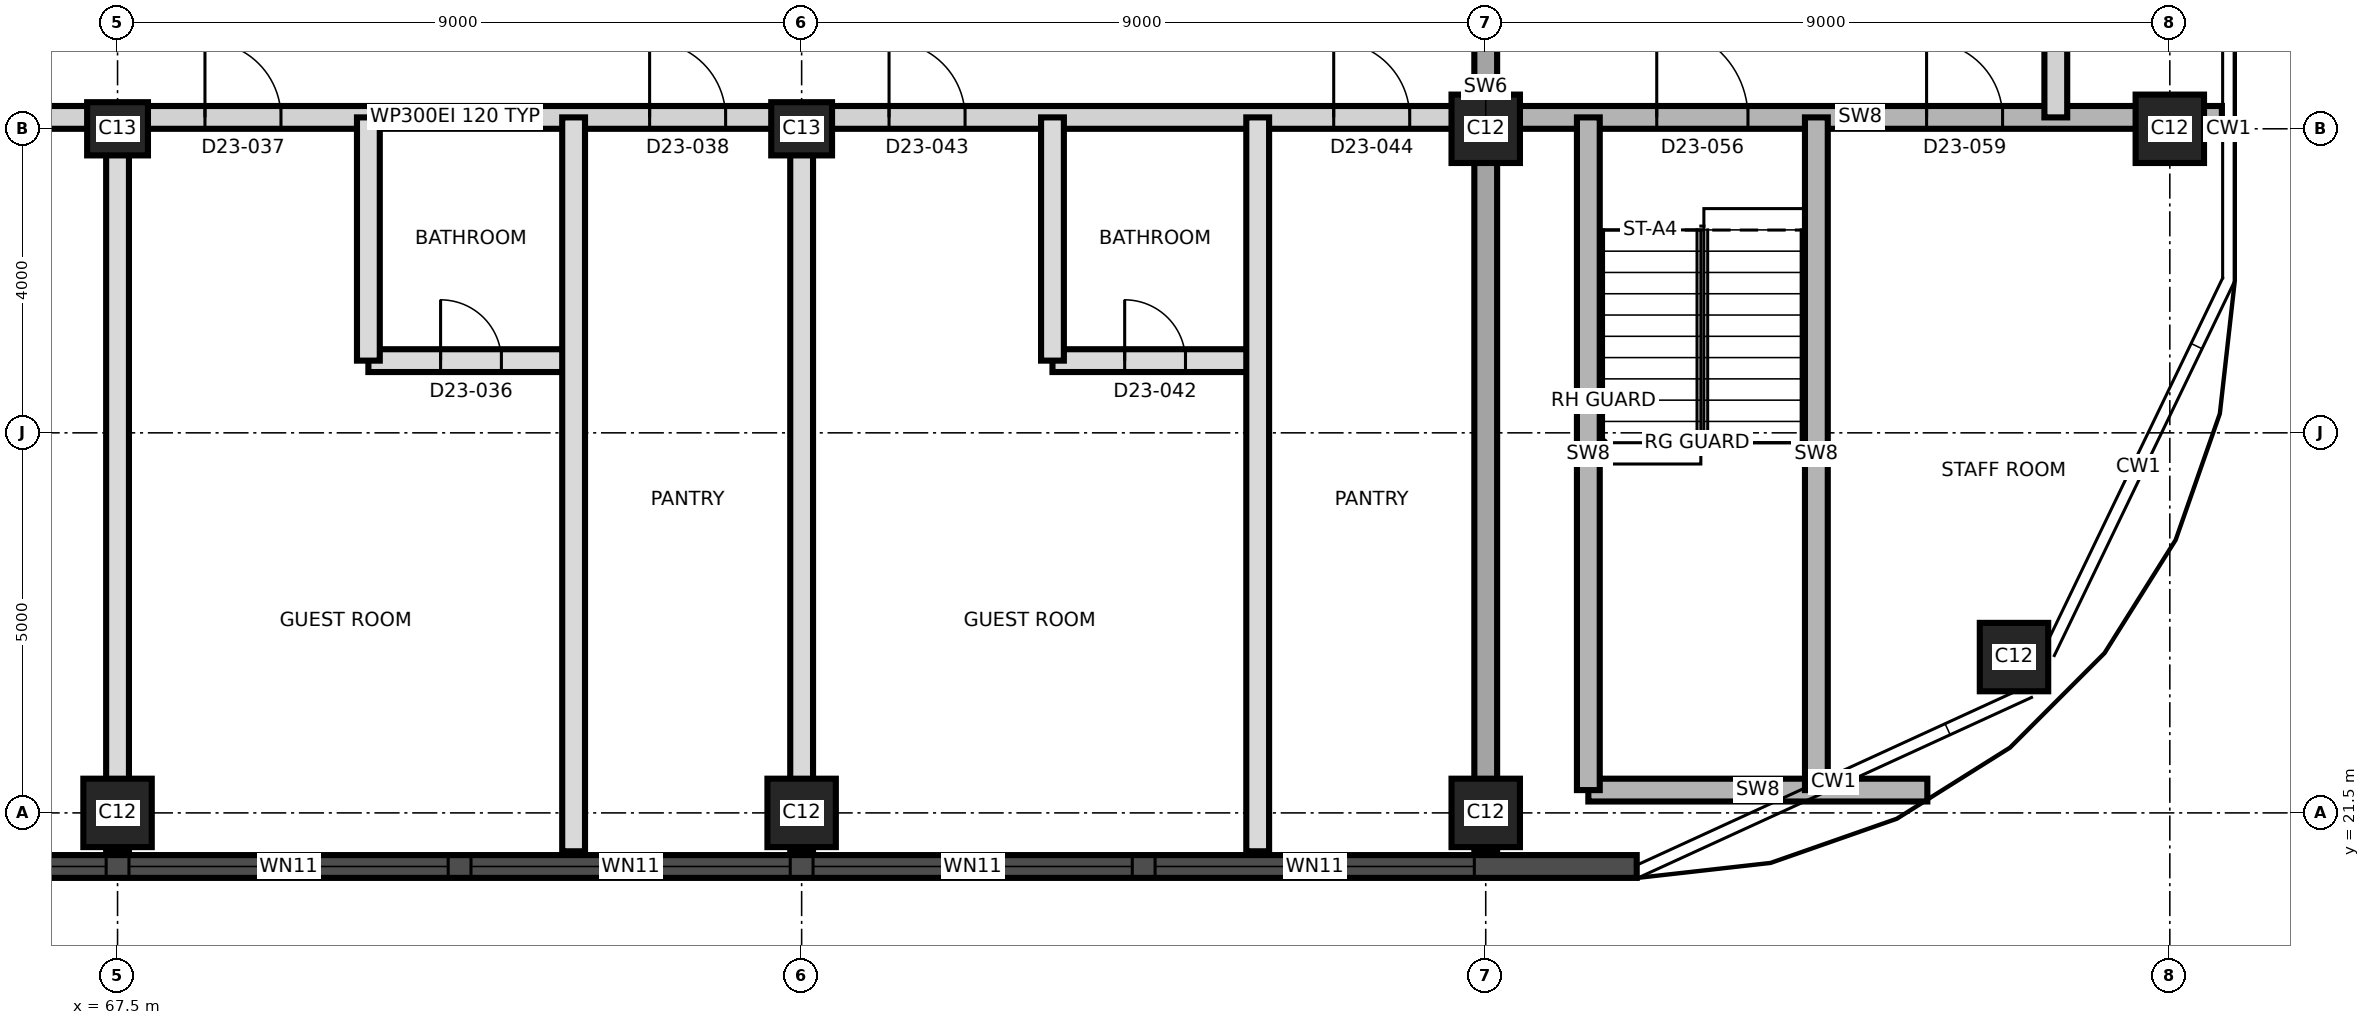
"""IFC4 building model, lengths in metres.
Left out: names, types, materials, properties, quantities, classifications, styles, units other than length and angle.
Written with IfcOpenShell. Run it as: python <this file> out.ifc"""

import sys

from ifc_helpers import new_model, si_unit, direction, frame, frame_2d, origin, origin_2d, place, context, subcontext, project, spatial, rectangle, extrude, element, fill, save


model = new_model("IFC4")
c1 = context("Model", 3, precision=1e-05, world=origin(), true_north=direction((0.0, 1.0)))
c2 = subcontext(c1, "Body", "Model", "MODEL_VIEW")
j1 = project(units=[si_unit("LENGTHUNIT", "METRE"), si_unit("PLANEANGLEUNIT", "RADIAN")], contexts=[c1])
p1 = place(None, origin())
s1 = spatial("IfcSite", under=j1, at=p1, CompositionType="ELEMENT")
p2 = place(p1, origin())
s2 = spatial("IfcBuilding", under=s1, at=p2, CompositionType="ELEMENT")
p3 = place(p2, frame((0.0, 0.0, 210.6)))
s3 = spatial("IfcBuildingStorey", under=s2, at=p3, CompositionType="ELEMENT", Elevation=210.6)
for number, where, z_axis, x_axis in (
    (1, (67.5, 21.5, 0.0), (0.0, 0.0, 1.0), (1.0, 0.0, 0.0)),
    (2, (76.5, 21.5, 0.0), (0.0, 0.0, 1.0), (1.0, 0.0, 0.0)),
    (3, (85.5, 21.5, 0.0), (0.0, 0.0, 1.0), (1.0, 0.0, 0.0)),
    (4, (92.45, 23.55, 0.0), (0.0, 0.0, 1.0), (1.0, 0.0, 0.0)),
):
    element("IfcColumn", number, at=place(p3, frame(where, z_axis=z_axis, x_axis=x_axis)), inside=s3, PredefinedType="COLUMN", context=c2, shape_type="SweptSolid", body=[
        extrude(rectangle(XDim=0.9, YDim=0.9, at=origin_2d()), origin(), (0.0, 0.0, 1.0), 3.7),
    ])
for number, where, z_axis, x_axis in (
    (5, (67.5, 30.5, 0.0), (0.0, 0.0, 1.0), (1.0, 0.0, 0.0)),
    (6, (76.5, 30.5, 0.0), (0.0, 0.0, 1.0), (1.0, 0.0, 0.0)),
):
    element("IfcColumn", number, at=place(p3, frame(where, z_axis=z_axis, x_axis=x_axis)), inside=s3, PredefinedType="COLUMN", context=c2, shape_type="SweptSolid", body=[
        extrude(rectangle(XDim=0.8, YDim=0.7, at=origin_2d()), origin(), (0.0, 0.0, 1.0), 3.7),
    ])
for number, where, z_axis, x_axis in (
    (7, (85.5, 30.5, 0.0), (0.0, 0.0, 1.0), (1.0, 0.0, 0.0)),
    (8, (94.5, 30.5, 0.0), (0.0, 0.0, 1.0), (1.0, 0.0, 0.0)),
):
    element("IfcColumn", number, at=place(p3, frame(where, z_axis=z_axis, x_axis=x_axis)), inside=s3, PredefinedType="COLUMN", context=c2, shape_type="SweptSolid", body=[
        extrude(rectangle(XDim=0.9, YDim=0.9, at=origin_2d()), origin(), (0.0, 0.0, 1.0), 3.7),
    ])
p4 = place(p3, frame((85.5, 20.995, 0.0), z_axis=(0.0, 0.0, 1.0), x_axis=(0.0, 1.0, 0.0)))
e9 = element("IfcWall", 9, at=p4, inside=s3, PredefinedType="SHEAR", context=c2, shape_type="SweptSolid", body=[
    extrude(rectangle(XDim=19.01, YDim=0.3, at=frame_2d((9.505, 0.0))), origin(), (0.0, 0.0, 1.0), 3.7),
])
p5 = place(p4, frame((10.705, 0.0, 0.0)))
e10 = element("IfcOpeningElement", 10, at=p5, cuts=e9, PredefinedType="OPENING", context=c2, shape_type="SweptSolid", body=[
    extrude(rectangle(XDim=1.4, YDim=2.1, at=frame_2d((0.7, 1.05))), frame((0.0, 0.16, 0.0), z_axis=(0.0, -1.0, 0.0), x_axis=(1.0, 0.0, 0.0)), (0.0, 0.0, 1.0), 0.32),
])
p6 = place(p3, frame((44.011, 20.795, 0.0), z_axis=(0.0, 0.0, 1.0), x_axis=(1.0, 0.0, 0.0)))
e11 = element("IfcWall", 11, at=p6, inside=s3, PredefinedType="SOLIDWALL", context=c2, shape_type="SweptSolid", body=[
    extrude(rectangle(XDim=43.476, YDim=0.3, at=frame_2d((21.738, 0.0))), origin(), (0.0, 0.0, 1.0), 3.4),
])
p7 = place(p6, frame((1.845, 0.0, 0.3)))
e12 = element("IfcOpeningElement", 12, at=p7, cuts=e11, PredefinedType="OPENING", context=c2, shape_type="SweptSolid", body=[
    extrude(rectangle(XDim=1.8, YDim=2.4, at=frame_2d((0.9, 1.2))), frame((0.0, 0.16, 0.0), z_axis=(0.0, -1.0, 0.0), x_axis=(1.0, 0.0, 0.0)), (0.0, 0.0, 1.0), 0.32),
])
p8 = place(p6, frame((5.639, 0.0, 0.9)))
e13 = element("IfcOpeningElement", 13, at=p8, cuts=e11, PredefinedType="OPENING", context=c2, shape_type="SweptSolid", body=[
    extrude(rectangle(XDim=4.2, YDim=1.5, at=frame_2d((2.1, 0.75))), frame((0.0, 0.16, 0.0), z_axis=(0.0, -1.0, 0.0), x_axis=(1.0, 0.0, 0.0)), (0.0, 0.0, 1.0), 0.32),
])
p9 = place(p6, frame((10.139, 0.0, 0.9)))
e14 = element("IfcOpeningElement", 14, at=p9, cuts=e11, PredefinedType="OPENING", context=c2, shape_type="SweptSolid", body=[
    extrude(rectangle(XDim=4.2, YDim=1.5, at=frame_2d((2.1, 0.75))), frame((0.0, 0.16, 0.0), z_axis=(0.0, -1.0, 0.0), x_axis=(1.0, 0.0, 0.0)), (0.0, 0.0, 1.0), 0.32),
])
p10 = place(p6, frame((14.639, 0.0, 0.9)))
e15 = element("IfcOpeningElement", 15, at=p10, cuts=e11, PredefinedType="OPENING", context=c2, shape_type="SweptSolid", body=[
    extrude(rectangle(XDim=4.2, YDim=1.5, at=frame_2d((2.1, 0.75))), frame((0.0, 0.16, 0.0), z_axis=(0.0, -1.0, 0.0), x_axis=(1.0, 0.0, 0.0)), (0.0, 0.0, 1.0), 0.32),
])
p11 = place(p6, frame((19.139, 0.0, 0.9)))
e16 = element("IfcOpeningElement", 16, at=p11, cuts=e11, PredefinedType="OPENING", context=c2, shape_type="SweptSolid", body=[
    extrude(rectangle(XDim=4.2, YDim=1.5, at=frame_2d((2.1, 0.75))), frame((0.0, 0.16, 0.0), z_axis=(0.0, -1.0, 0.0), x_axis=(1.0, 0.0, 0.0)), (0.0, 0.0, 1.0), 0.32),
])
p12 = place(p6, frame((23.639, 0.0, 0.9)))
e17 = element("IfcOpeningElement", 17, at=p12, cuts=e11, PredefinedType="OPENING", context=c2, shape_type="SweptSolid", body=[
    extrude(rectangle(XDim=4.2, YDim=1.5, at=frame_2d((2.1, 0.75))), frame((0.0, 0.16, 0.0), z_axis=(0.0, -1.0, 0.0), x_axis=(1.0, 0.0, 0.0)), (0.0, 0.0, 1.0), 0.32),
])
p13 = place(p6, frame((28.139, 0.0, 0.9)))
e18 = element("IfcOpeningElement", 18, at=p13, cuts=e11, PredefinedType="OPENING", context=c2, shape_type="SweptSolid", body=[
    extrude(rectangle(XDim=4.2, YDim=1.5, at=frame_2d((2.1, 0.75))), frame((0.0, 0.16, 0.0), z_axis=(0.0, -1.0, 0.0), x_axis=(1.0, 0.0, 0.0)), (0.0, 0.0, 1.0), 0.32),
])
p14 = place(p6, frame((32.639, 0.0, 0.9)))
e19 = element("IfcOpeningElement", 19, at=p14, cuts=e11, PredefinedType="OPENING", context=c2, shape_type="SweptSolid", body=[
    extrude(rectangle(XDim=4.2, YDim=1.5, at=frame_2d((2.1, 0.75))), frame((0.0, 0.16, 0.0), z_axis=(0.0, -1.0, 0.0), x_axis=(1.0, 0.0, 0.0)), (0.0, 0.0, 1.0), 0.32),
])
p15 = place(p6, frame((37.139, 0.0, 0.9)))
e20 = element("IfcOpeningElement", 20, at=p15, cuts=e11, PredefinedType="OPENING", context=c2, shape_type="SweptSolid", body=[
    extrude(rectangle(XDim=4.2, YDim=1.5, at=frame_2d((2.1, 0.75))), frame((0.0, 0.16, 0.0), z_axis=(0.0, -1.0, 0.0), x_axis=(1.0, 0.0, 0.0)), (0.0, 0.0, 1.0), 0.32),
])
p16 = place(p3, frame((86.85, 21.8, 0.0), z_axis=(0.0, 0.0, 1.0), x_axis=(1.0, 0.0, 0.0)))
e21 = element("IfcWall", 21, at=p16, inside=s3, PredefinedType="SHEAR", context=c2, shape_type="SweptSolid", body=[
    extrude(rectangle(XDim=4.46, YDim=0.3, at=frame_2d((2.23, 0.0))), origin(), (0.0, 0.0, 1.0), 3.4),
])
p17 = place(p3, frame((70.8, 27.45, 0.0), z_axis=(0.0, 0.0, 1.0), x_axis=(1.0, 0.0, 0.0)))
e22 = element("IfcWall", 22, at=p17, inside=s3, PredefinedType="PARTITIONING", context=c2, shape_type="SweptSolid", body=[
    extrude(rectangle(XDim=2.7, YDim=0.3, at=frame_2d((1.35, 0.0))), origin(), (0.0, 0.0, 1.0), 3.4),
])
p18 = place(p17, frame((0.95, 0.0, 0.0)))
e23 = element("IfcOpeningElement", 23, at=p18, cuts=e22, PredefinedType="OPENING", context=c2, shape_type="SweptSolid", body=[
    extrude(rectangle(XDim=0.8, YDim=2.1, at=frame_2d((0.4, 1.05))), frame((0.0, 0.16, 0.0), z_axis=(0.0, -1.0, 0.0), x_axis=(1.0, 0.0, 0.0)), (0.0, 0.0, 1.0), 0.32),
])
p19 = place(p3, frame((79.8, 27.45, 0.0), z_axis=(0.0, 0.0, 1.0), x_axis=(1.0, 0.0, 0.0)))
e24 = element("IfcWall", 24, at=p19, inside=s3, PredefinedType="PARTITIONING", context=c2, shape_type="SweptSolid", body=[
    extrude(rectangle(XDim=2.7, YDim=0.3, at=frame_2d((1.35, 0.0))), origin(), (0.0, 0.0, 1.0), 3.4),
])
p20 = place(p19, frame((0.95, 0.0, 0.0)))
e25 = element("IfcOpeningElement", 25, at=p20, cuts=e24, PredefinedType="OPENING", context=c2, shape_type="SweptSolid", body=[
    extrude(rectangle(XDim=0.8, YDim=2.1, at=frame_2d((0.4, 1.05))), frame((0.0, 0.16, 0.0), z_axis=(0.0, -1.0, 0.0), x_axis=(1.0, 0.0, 0.0)), (0.0, 0.0, 1.0), 0.32),
])
p21 = place(p3, frame((58.55, 30.65, 0.0), z_axis=(0.0, 0.0, 1.0), x_axis=(1.0, 0.0, 0.0)))
e26 = element("IfcWall", 26, at=p21, inside=s3, PredefinedType="PARTITIONING", context=c2, shape_type="SweptSolid", body=[
    extrude(rectangle(XDim=26.78, YDim=0.3, at=frame_2d((13.39, 0.0))), origin(), (0.0, 0.0, 1.0), 3.4),
])
p22 = place(p21, frame((3.365, 0.0, 0.0)))
e27 = element("IfcOpeningElement", 27, at=p22, cuts=e26, PredefinedType="OPENING", context=c2, shape_type="SweptSolid", body=[
    extrude(rectangle(XDim=1.0, YDim=2.1, at=frame_2d((0.5, 1.05))), frame((0.0, 0.16, 0.0), z_axis=(0.0, -1.0, 0.0), x_axis=(1.0, 0.0, 0.0)), (0.0, 0.0, 1.0), 0.32),
])
p23 = place(p21, frame((6.315, 0.0, 0.0)))
e28 = element("IfcOpeningElement", 28, at=p23, cuts=e26, PredefinedType="OPENING", context=c2, shape_type="SweptSolid", body=[
    extrude(rectangle(XDim=1.4, YDim=2.1, at=frame_2d((0.7, 1.05))), frame((0.0, 0.16, 0.0), z_axis=(0.0, -1.0, 0.0), x_axis=(1.0, 0.0, 0.0)), (0.0, 0.0, 1.0), 0.32),
])
p24 = place(p21, frame((10.1, 0.0, 0.0)))
e29 = element("IfcOpeningElement", 29, at=p24, cuts=e26, PredefinedType="OPENING", context=c2, shape_type="SweptSolid", body=[
    extrude(rectangle(XDim=1.0, YDim=2.1, at=frame_2d((0.5, 1.05))), frame((0.0, 0.16, 0.0), z_axis=(0.0, -1.0, 0.0), x_axis=(1.0, 0.0, 0.0)), (0.0, 0.0, 1.0), 0.32),
])
p25 = place(p21, frame((15.95, 0.0, 0.0)))
e30 = element("IfcOpeningElement", 30, at=p25, cuts=e26, PredefinedType="OPENING", context=c2, shape_type="SweptSolid", body=[
    extrude(rectangle(XDim=1.0, YDim=2.1, at=frame_2d((0.5, 1.05))), frame((0.0, 0.16, 0.0), z_axis=(0.0, -1.0, 0.0), x_axis=(1.0, 0.0, 0.0)), (0.0, 0.0, 1.0), 0.32),
])
p26 = place(p21, frame((19.1, 0.0, 0.0)))
e31 = element("IfcOpeningElement", 31, at=p26, cuts=e26, PredefinedType="OPENING", context=c2, shape_type="SweptSolid", body=[
    extrude(rectangle(XDim=1.0, YDim=2.1, at=frame_2d((0.5, 1.05))), frame((0.0, 0.16, 0.0), z_axis=(0.0, -1.0, 0.0), x_axis=(1.0, 0.0, 0.0)), (0.0, 0.0, 1.0), 0.32),
])
p27 = place(p21, frame((24.95, 0.0, 0.0)))
e32 = element("IfcOpeningElement", 32, at=p27, cuts=e26, PredefinedType="OPENING", context=c2, shape_type="SweptSolid", body=[
    extrude(rectangle(XDim=1.0, YDim=2.1, at=frame_2d((0.5, 1.05))), frame((0.0, 0.16, 0.0), z_axis=(0.0, -1.0, 0.0), x_axis=(1.0, 0.0, 0.0)), (0.0, 0.0, 1.0), 0.32),
])
p28 = place(p3, frame((85.67, 30.65, 0.0), z_axis=(0.0, 0.0, 1.0), x_axis=(1.0, 0.0, 0.0)))
e33 = element("IfcWall", 33, at=p28, inside=s3, PredefinedType="SHEAR", context=c2, shape_type="SweptSolid", body=[
    extrude(rectangle(XDim=9.515, YDim=0.3, at=frame_2d((4.758, 0.0))), origin(), (0.0, 0.0, 1.0), 3.4),
])
p29 = place(p28, frame((2.08, 0.0, 0.0)))
e34 = element("IfcOpeningElement", 34, at=p29, cuts=e33, PredefinedType="OPENING", context=c2, shape_type="SweptSolid", body=[
    extrude(rectangle(XDim=1.2, YDim=2.1, at=frame_2d((0.6, 1.05))), frame((0.0, 0.16, 0.0), z_axis=(0.0, -1.0, 0.0), x_axis=(1.0, 0.0, 0.0)), (0.0, 0.0, 1.0), 0.32),
])
p30 = place(p28, frame((5.63, 0.0, 0.0)))
e35 = element("IfcOpeningElement", 35, at=p30, cuts=e33, PredefinedType="OPENING", context=c2, shape_type="SweptSolid", body=[
    extrude(rectangle(XDim=1.0, YDim=2.1, at=frame_2d((0.5, 1.05))), frame((0.0, 0.16, 0.0), z_axis=(0.0, -1.0, 0.0), x_axis=(1.0, 0.0, 0.0)), (0.0, 0.0, 1.0), 0.32),
])
p31 = place(p3, frame((67.5, 20.995, 0.0), z_axis=(0.0, 0.0, 1.0), x_axis=(0.0, 1.0, 0.0)))
e36 = element("IfcWall", 36, at=p31, inside=s3, PredefinedType="PARTITIONING", context=c2, shape_type="SweptSolid", body=[
    extrude(rectangle(XDim=9.655, YDim=0.3, at=frame_2d((4.827, 0.0))), origin(), (0.0, 0.0, 1.0), 3.35),
])
p32 = place(p3, frame((70.8, 27.45, 0.0), z_axis=(0.0, 0.0, 1.0), x_axis=(0.0, 1.0, 0.0)))
e37 = element("IfcWall", 37, at=p32, inside=s3, PredefinedType="PARTITIONING", context=c2, shape_type="SweptSolid", body=[
    extrude(rectangle(XDim=3.2, YDim=0.3, at=frame_2d((1.6, 0.0))), origin(), (0.0, 0.0, 1.0), 3.4),
])
for number, where, z_axis, x_axis in (
    (38, (73.5, 20.995, 0.0), (0.0, 0.0, 1.0), (0.0, 1.0, 0.0)),
    (39, (76.5, 20.995, 0.0), (0.0, 0.0, 1.0), (0.0, 1.0, 0.0)),
):
    element("IfcWall", number, at=place(p3, frame(where, z_axis=z_axis, x_axis=x_axis)), inside=s3, PredefinedType="PARTITIONING", context=c2, shape_type="SweptSolid", body=[
        extrude(rectangle(XDim=9.655, YDim=0.3, at=frame_2d((4.827, 0.0))), origin(), (0.0, 0.0, 1.0), 3.35),
    ])
p33 = place(p3, frame((79.8, 27.45, 0.0), z_axis=(0.0, 0.0, 1.0), x_axis=(0.0, 1.0, 0.0)))
e40 = element("IfcWall", 40, at=p33, inside=s3, PredefinedType="PARTITIONING", context=c2, shape_type="SweptSolid", body=[
    extrude(rectangle(XDim=3.2, YDim=0.3, at=frame_2d((1.6, 0.0))), origin(), (0.0, 0.0, 1.0), 3.4),
])
p34 = place(p3, frame((82.5, 20.995, 0.0), z_axis=(0.0, 0.0, 1.0), x_axis=(0.0, 1.0, 0.0)))
e41 = element("IfcWall", 41, at=p34, inside=s3, PredefinedType="PARTITIONING", context=c2, shape_type="SweptSolid", body=[
    extrude(rectangle(XDim=9.655, YDim=0.3, at=frame_2d((4.827, 0.0))), origin(), (0.0, 0.0, 1.0), 3.35),
])
for number, where, z_axis, x_axis in (
    (42, (86.85, 21.8, 0.0), (0.0, 0.0, 1.0), (0.0, 1.0, 0.0)),
    (43, (89.85, 21.8, 0.0), (0.0, 0.0, 1.0), (0.0, 1.0, 0.0)),
):
    element("IfcWall", number, at=place(p3, frame(where, z_axis=z_axis, x_axis=x_axis)), inside=s3, PredefinedType="SHEAR", context=c2, shape_type="SweptSolid", body=[
        extrude(rectangle(XDim=8.85, YDim=0.3, at=frame_2d((4.425, 0.0))), origin(), (0.0, 0.0, 1.0), 3.4),
    ])
p35 = place(p3, frame((93.0, 30.65, 0.0), z_axis=(0.0, 0.0, 1.0), x_axis=(0.0, 1.0, 0.0)))
e44 = element("IfcWall", 44, at=p35, inside=s3, PredefinedType="PARTITIONING", context=c2, shape_type="SweptSolid", body=[
    extrude(rectangle(XDim=2.7, YDim=0.3, at=frame_2d((1.35, 0.0))), origin(), (0.0, 0.0, 1.0), 3.4),
])
p36 = place(p11, origin())
e45 = element("IfcWindow", 45, at=p36, inside=s3, PartitioningType="SINGLE_PANEL", PredefinedType="WINDOW", context=c2, shape_type="SweptSolid", body=[
    extrude(rectangle(XDim=4.2, YDim=1.5, at=frame_2d((2.1, 0.75))), frame((0.0, 0.03, 0.0), z_axis=(0.0, -1.0, 0.0), x_axis=(1.0, 0.0, 0.0)), (0.0, 0.0, 1.0), 0.06),
])
fill(e16, e45)
p37 = place(p12, origin())
e46 = element("IfcWindow", 46, at=p37, inside=s3, PartitioningType="SINGLE_PANEL", PredefinedType="WINDOW", context=c2, shape_type="SweptSolid", body=[
    extrude(rectangle(XDim=4.2, YDim=1.5, at=frame_2d((2.1, 0.75))), frame((0.0, 0.03, 0.0), z_axis=(0.0, -1.0, 0.0), x_axis=(1.0, 0.0, 0.0)), (0.0, 0.0, 1.0), 0.06),
])
fill(e17, e46)
p38 = place(p13, origin())
e47 = element("IfcWindow", 47, at=p38, inside=s3, PartitioningType="SINGLE_PANEL", PredefinedType="WINDOW", context=c2, shape_type="SweptSolid", body=[
    extrude(rectangle(XDim=4.2, YDim=1.5, at=frame_2d((2.1, 0.75))), frame((0.0, 0.03, 0.0), z_axis=(0.0, -1.0, 0.0), x_axis=(1.0, 0.0, 0.0)), (0.0, 0.0, 1.0), 0.06),
])
fill(e18, e47)
p39 = place(p14, origin())
e48 = element("IfcWindow", 48, at=p39, inside=s3, PartitioningType="SINGLE_PANEL", PredefinedType="WINDOW", context=c2, shape_type="SweptSolid", body=[
    extrude(rectangle(XDim=4.2, YDim=1.5, at=frame_2d((2.1, 0.75))), frame((0.0, 0.03, 0.0), z_axis=(0.0, -1.0, 0.0), x_axis=(1.0, 0.0, 0.0)), (0.0, 0.0, 1.0), 0.06),
])
fill(e19, e48)
p40 = place(p15, origin())
e49 = element("IfcWindow", 49, at=p40, inside=s3, PartitioningType="SINGLE_PANEL", PredefinedType="WINDOW", context=c2, shape_type="SweptSolid", body=[
    extrude(rectangle(XDim=4.2, YDim=1.5, at=frame_2d((2.1, 0.75))), frame((0.0, 0.03, 0.0), z_axis=(0.0, -1.0, 0.0), x_axis=(1.0, 0.0, 0.0)), (0.0, 0.0, 1.0), 0.06),
])
fill(e20, e49)
p41 = place(p18, origin())
e50 = element("IfcDoor", 50, at=p41, inside=s3, OperationType="SINGLE_SWING_LEFT", PredefinedType="DOOR", context=c2, shape_type="SweptSolid", body=[
    extrude(rectangle(XDim=0.8, YDim=2.1, at=frame_2d((0.4, 1.05))), frame((0.0, 0.025, 0.0), z_axis=(0.0, -1.0, 0.0), x_axis=(1.0, 0.0, 0.0)), (0.0, 0.0, 1.0), 0.05),
])
fill(e23, e50)
p42 = place(p24, origin())
e51 = element("IfcDoor", 51, at=p42, inside=s3, OperationType="SINGLE_SWING_LEFT", PredefinedType="DOOR", context=c2, shape_type="SweptSolid", body=[
    extrude(rectangle(XDim=1.0, YDim=2.1, at=frame_2d((0.5, 1.05))), frame((0.0, 0.025, 0.0), z_axis=(0.0, -1.0, 0.0), x_axis=(1.0, 0.0, 0.0)), (0.0, 0.0, 1.0), 0.05),
])
fill(e29, e51)
p43 = place(p25, origin())
e52 = element("IfcDoor", 52, at=p43, inside=s3, OperationType="SINGLE_SWING_RIGHT", PredefinedType="DOOR", context=c2, shape_type="SweptSolid", body=[
    extrude(rectangle(XDim=1.0, YDim=2.1, at=frame_2d((0.5, 1.05))), frame((0.0, 0.025, 0.0), z_axis=(0.0, -1.0, 0.0), x_axis=(1.0, 0.0, 0.0)), (0.0, 0.0, 1.0), 0.05),
])
fill(e30, e52)
p44 = place(p20, origin())
e53 = element("IfcDoor", 53, at=p44, inside=s3, OperationType="SINGLE_SWING_LEFT", PredefinedType="DOOR", context=c2, shape_type="SweptSolid", body=[
    extrude(rectangle(XDim=0.8, YDim=2.1, at=frame_2d((0.4, 1.05))), frame((0.0, 0.025, 0.0), z_axis=(0.0, -1.0, 0.0), x_axis=(1.0, 0.0, 0.0)), (0.0, 0.0, 1.0), 0.05),
])
fill(e25, e53)
p45 = place(p26, origin())
e54 = element("IfcDoor", 54, at=p45, inside=s3, OperationType="SINGLE_SWING_LEFT", PredefinedType="DOOR", context=c2, shape_type="SweptSolid", body=[
    extrude(rectangle(XDim=1.0, YDim=2.1, at=frame_2d((0.5, 1.05))), frame((0.0, 0.025, 0.0), z_axis=(0.0, -1.0, 0.0), x_axis=(1.0, 0.0, 0.0)), (0.0, 0.0, 1.0), 0.05),
])
fill(e31, e54)
p46 = place(p27, origin())
e55 = element("IfcDoor", 55, at=p46, inside=s3, OperationType="SINGLE_SWING_RIGHT", PredefinedType="DOOR", context=c2, shape_type="SweptSolid", body=[
    extrude(rectangle(XDim=1.0, YDim=2.1, at=frame_2d((0.5, 1.05))), frame((0.0, 0.025, 0.0), z_axis=(0.0, -1.0, 0.0), x_axis=(1.0, 0.0, 0.0)), (0.0, 0.0, 1.0), 0.05),
])
fill(e32, e55)
p47 = place(p29, origin())
e56 = element("IfcDoor", 56, at=p47, inside=s3, OperationType="SINGLE_SWING_LEFT", PredefinedType="DOOR", context=c2, shape_type="SweptSolid", body=[
    extrude(rectangle(XDim=1.2, YDim=2.1, at=frame_2d((0.6, 1.05))), frame((0.0, 0.025, 0.0), z_axis=(0.0, -1.0, 0.0), x_axis=(1.0, 0.0, 0.0)), (0.0, 0.0, 1.0), 0.05),
])
fill(e34, e56)
p48 = place(p30, origin())
e57 = element("IfcDoor", 57, at=p48, inside=s3, OperationType="SINGLE_SWING_LEFT", PredefinedType="DOOR", context=c2, shape_type="SweptSolid", body=[
    extrude(rectangle(XDim=1.0, YDim=2.1, at=frame_2d((0.5, 1.05))), frame((0.0, 0.025, 0.0), z_axis=(0.0, -1.0, 0.0), x_axis=(1.0, 0.0, 0.0)), (0.0, 0.0, 1.0), 0.05),
])
fill(e35, e57)
save(model, sys.argv[1])
